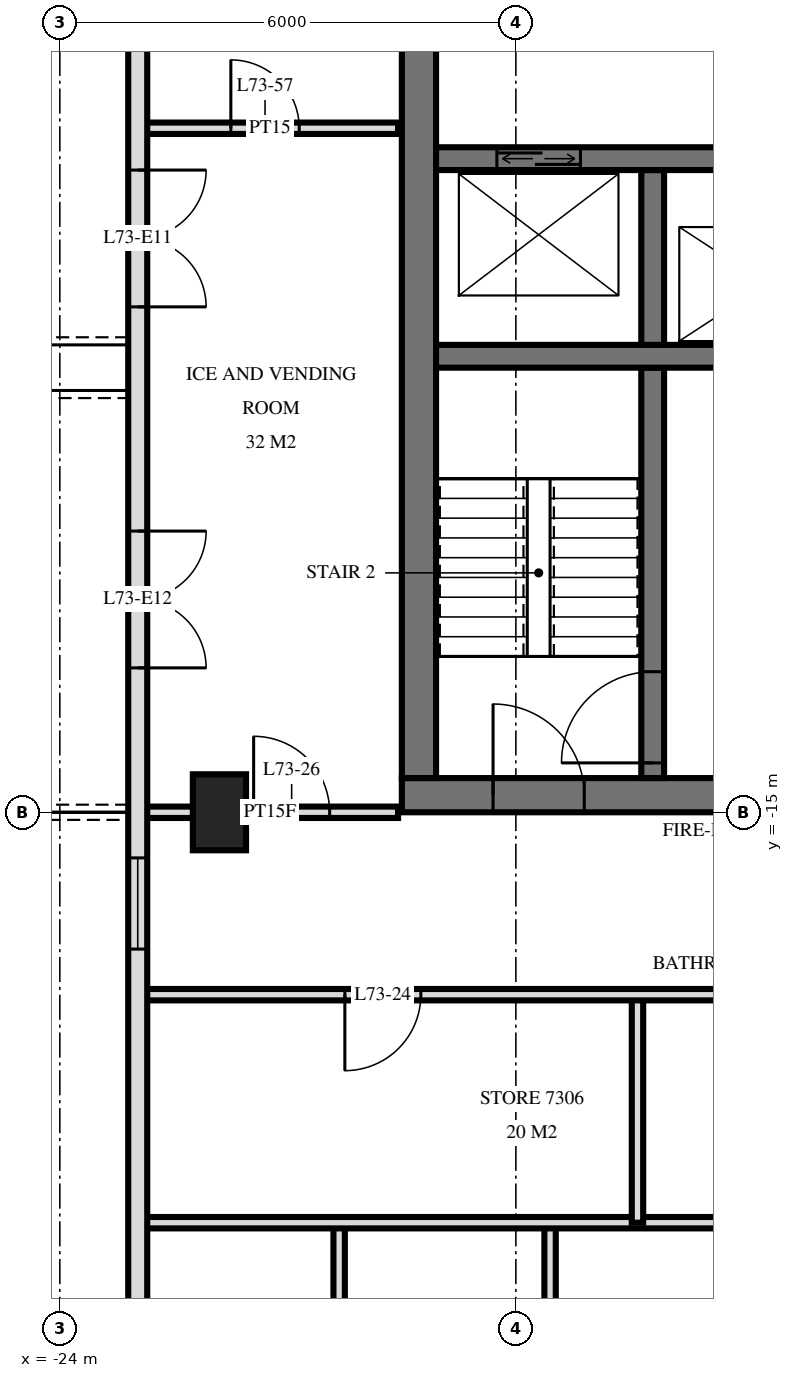
"""IFC4 building model, lengths in metres.
Left out: names, types, materials, properties, quantities, classifications, styles, units other than length and angle.
Written with IfcOpenShell. Run it as: python <this file> out.ifc"""

import sys

from ifc_helpers import new_model, si_unit, direction, frame, frame_2d, origin, origin_2d, place, context, subcontext, project, spatial, rectangle, extrude, element, fill, save


model = new_model("IFC4")
c1 = context("Model", 3, precision=1e-05, world=origin(), true_north=direction((0.0, 1.0)))
c2 = subcontext(c1, "Body", "Model", "MODEL_VIEW")
j1 = project(units=[si_unit("LENGTHUNIT", "METRE"), si_unit("PLANEANGLEUNIT", "RADIAN")], contexts=[c1])
p1 = place(None, origin())
s1 = spatial("IfcSite", under=j1, at=p1, CompositionType="ELEMENT")
p2 = place(p1, origin())
s2 = spatial("IfcBuilding", under=s1, at=p2, CompositionType="ELEMENT")
p3 = place(p2, frame((0.0, 0.0, 277.1)))
s3 = spatial("IfcBuildingStorey", under=s2, at=p3, CompositionType="ELEMENT", Elevation=277.1)
p4 = place(p3, frame((-21.9, -15.0, 0.0), z_axis=(0.0, 0.0, 1.0), x_axis=(0.0, 1.0, 0.0)))
e1 = element("IfcColumn", 1, at=p4, inside=s3, PredefinedType="COLUMN", context=c2, shape_type="SweptSolid", body=[
    extrude(rectangle(XDim=1.0, YDim=0.7, at=origin_2d()), origin(), (0.0, 0.0, 1.0), 3.5),
])
p5 = place(p3, frame((-19.5, -14.775, 0.0), z_axis=(0.0, 0.0, 1.0), x_axis=(1.0, 0.0, 0.0)))
e2 = element("IfcWall", 2, at=p5, inside=s3, PredefinedType="SHEAR", context=c2, shape_type="SweptSolid", body=[
    extrude(rectangle(XDim=9.5, YDim=0.45, at=frame_2d((4.75, 0.0))), origin(), (0.0, 0.0, 1.0), 3.5),
])
p6 = place(p5, frame((1.2, 0.0, 0.0)))
e3 = element("IfcOpeningElement", 3, at=p6, cuts=e2, PredefinedType="OPENING", context=c2, shape_type="SweptSolid", body=[
    extrude(rectangle(XDim=1.2, YDim=2.1, at=frame_2d((0.6, 1.05))), frame((0.0, 0.235, 0.0), z_axis=(0.0, -1.0, 0.0), x_axis=(1.0, 0.0, 0.0)), (0.0, 0.0, 1.0), 0.47),
])
p7 = place(p5, frame((4.25, 0.0, 0.0)))
e4 = element("IfcOpeningElement", 4, at=p7, cuts=e2, PredefinedType="OPENING", context=c2, shape_type="SweptSolid", body=[
    extrude(rectangle(XDim=1.1, YDim=2.1, at=frame_2d((0.55, 1.05))), frame((0.0, 0.235, 0.0), z_axis=(0.0, -1.0, 0.0), x_axis=(1.0, 0.0, 0.0)), (0.0, 0.0, 1.0), 0.47),
])
p8 = place(p3, frame((-19.275, -14.55, 0.0), z_axis=(0.0, 0.0, 1.0), x_axis=(0.0, 1.0, 0.0)))
e5 = element("IfcWall", 5, at=p8, inside=s3, PredefinedType="SHEAR", context=c2, shape_type="SweptSolid", body=[
    extrude(rectangle(XDim=14.1, YDim=0.45, at=frame_2d((7.05, 0.0))), origin(), (0.0, 0.0, 1.0), 3.5),
])
p9 = place(p3, frame((-19.05, -6.4, 0.0), z_axis=(0.0, 0.0, 1.0), x_axis=(1.0, 0.0, 0.0)))
e6 = element("IfcWall", 6, at=p9, inside=s3, PredefinedType="SHEAR", context=c2, shape_type="SweptSolid", body=[
    extrude(rectangle(XDim=8.7, YDim=0.3, at=frame_2d((4.35, 0.0))), origin(), (0.0, 0.0, 1.0), 3.5),
])
p10 = place(p9, frame((0.8, 0.0, 0.0)))
e7 = element("IfcOpeningElement", 7, at=p10, cuts=e6, PredefinedType="OPENING", context=c2, shape_type="SweptSolid", body=[
    extrude(rectangle(XDim=1.1, YDim=2.1, at=frame_2d((0.55, 1.05))), frame((0.0, 0.16, 0.0), z_axis=(0.0, -1.0, 0.0), x_axis=(1.0, 0.0, 0.0)), (0.0, 0.0, 1.0), 0.32),
])
p11 = place(p3, frame((-19.05, -9.0, 0.0), z_axis=(0.0, 0.0, 1.0), x_axis=(1.0, 0.0, 0.0)))
e8 = element("IfcWall", 8, at=p11, inside=s3, PredefinedType="SHEAR", context=c2, shape_type="SweptSolid", body=[
    extrude(rectangle(XDim=8.7, YDim=0.3, at=frame_2d((4.35, 0.0))), origin(), (0.0, 0.0, 1.0), 3.5),
])
p12 = place(p11, frame((3.8, 0.0, 0.0)))
e9 = element("IfcOpeningElement", 9, at=p12, cuts=e8, PredefinedType="OPENING", context=c2, shape_type="SweptSolid", body=[
    extrude(rectangle(XDim=1.1, YDim=2.1, at=frame_2d((0.55, 1.05))), frame((0.0, 0.16, 0.0), z_axis=(0.0, -1.0, 0.0), x_axis=(1.0, 0.0, 0.0)), (0.0, 0.0, 1.0), 0.32),
])
p13 = place(p3, frame((-16.2, -8.85, 0.0), z_axis=(0.0, 0.0, 1.0), x_axis=(0.0, 1.0, 0.0)))
e10 = element("IfcWall", 10, at=p13, inside=s3, PredefinedType="SHEAR", context=c2, shape_type="SweptSolid", body=[
    extrude(rectangle(XDim=2.3, YDim=0.3, at=frame_2d((1.15, 0.0))), origin(), (0.0, 0.0, 1.0), 3.5),
])
p14 = place(p3, frame((-16.2, -14.55, 0.0), z_axis=(0.0, 0.0, 1.0), x_axis=(0.0, 1.0, 0.0)))
e11 = element("IfcWall", 11, at=p14, inside=s3, PredefinedType="SHEAR", context=c2, shape_type="SweptSolid", body=[
    extrude(rectangle(XDim=5.4, YDim=0.3, at=frame_2d((2.7, 0.0))), origin(), (0.0, 0.0, 1.0), 3.5),
])
p15 = place(p14, frame((0.2, 0.0, 0.0)))
e12 = element("IfcOpeningElement", 12, at=p15, cuts=e11, PredefinedType="OPENING", context=c2, shape_type="SweptSolid", body=[
    extrude(rectangle(XDim=1.2, YDim=2.1, at=frame_2d((0.6, 1.05))), frame((0.0, 0.16, 0.0), z_axis=(0.0, -1.0, 0.0), x_axis=(1.0, 0.0, 0.0)), (0.0, 0.0, 1.0), 0.32),
])
p16 = place(p3, frame((-22.975, -3.325, 0.0), z_axis=(0.0, 0.0, 1.0), x_axis=(0.0, -1.0, 0.0)))
e13 = element("IfcWall", 13, at=p16, inside=s3, PredefinedType="SOLIDWALL", context=c2, shape_type="SweptSolid", body=[
    extrude(rectangle(XDim=25.951, YDim=0.25, at=frame_2d((12.975, 0.0))), origin(), (0.0, 0.0, 1.0), 3.22),
])
p17 = place(p16, frame((3.225, 0.0, 0.0)))
e14 = element("IfcOpeningElement", 14, at=p17, cuts=e13, PredefinedType="OPENING", context=c2, shape_type="SweptSolid", body=[
    extrude(rectangle(XDim=1.8, YDim=2.4, at=frame_2d((0.9, 1.2))), frame((0.0, 0.135, 0.0), z_axis=(0.0, -1.0, 0.0), x_axis=(1.0, 0.0, 0.0)), (0.0, 0.0, 1.0), 0.27),
])
p18 = place(p16, frame((7.975, 0.0, 0.0)))
e15 = element("IfcOpeningElement", 15, at=p18, cuts=e13, PredefinedType="OPENING", context=c2, shape_type="SweptSolid", body=[
    extrude(rectangle(XDim=1.8, YDim=2.4, at=frame_2d((0.9, 1.2))), frame((0.0, 0.135, 0.0), z_axis=(0.0, -1.0, 0.0), x_axis=(1.0, 0.0, 0.0)), (0.0, 0.0, 1.0), 0.27),
])
p19 = place(p16, frame((12.275, 0.0, 0.9)))
e16 = element("IfcOpeningElement", 16, at=p19, cuts=e13, PredefinedType="OPENING", context=c2, shape_type="SweptSolid", body=[
    extrude(rectangle(XDim=1.2, YDim=1.5, at=frame_2d((0.6, 0.75))), frame((0.0, 0.135, 0.0), z_axis=(0.0, -1.0, 0.0), x_axis=(1.0, 0.0, 0.0)), (0.0, 0.0, 1.0), 0.27),
])
p20 = place(p16, frame((18.175, 0.0, 0.0)))
e17 = element("IfcOpeningElement", 17, at=p20, cuts=e13, PredefinedType="OPENING", context=c2, shape_type="SweptSolid", body=[
    extrude(rectangle(XDim=1.8, YDim=2.4, at=frame_2d((0.9, 1.2))), frame((0.0, 0.135, 0.0), z_axis=(0.0, -1.0, 0.0), x_axis=(1.0, 0.0, 0.0)), (0.0, 0.0, 1.0), 0.27),
])
p21 = place(p16, frame((21.075, 0.0, 0.0)))
e18 = element("IfcOpeningElement", 18, at=p21, cuts=e13, PredefinedType="OPENING", context=c2, shape_type="SweptSolid", body=[
    extrude(rectangle(XDim=1.8, YDim=2.4, at=frame_2d((0.9, 1.2))), frame((0.0, 0.135, 0.0), z_axis=(0.0, -1.0, 0.0), x_axis=(1.0, 0.0, 0.0)), (0.0, 0.0, 1.0), 0.27),
])
p22 = place(p16, frame((23.825, 0.0, 0.9)))
e19 = element("IfcOpeningElement", 19, at=p22, cuts=e13, PredefinedType="OPENING", context=c2, shape_type="SweptSolid", body=[
    extrude(rectangle(XDim=1.8, YDim=1.5, at=frame_2d((0.9, 0.75))), frame((0.0, 0.135, 0.0), z_axis=(0.0, -1.0, 0.0), x_axis=(1.0, 0.0, 0.0)), (0.0, 0.0, 1.0), 0.27),
])
p23 = place(p3, frame((-16.4, -20.4, 0.0), z_axis=(0.0, 0.0, 1.0), x_axis=(0.0, 1.0, 0.0)))
e20 = element("IfcWall", 20, at=p23, inside=s3, PredefinedType="PARTITIONING", context=c2, shape_type="SweptSolid", body=[
    extrude(rectangle(XDim=3.0, YDim=0.15, at=frame_2d((1.5, 0.0))), origin(), (0.0, 0.0, 1.0), 3.22),
])
p24 = place(p3, frame((-17.55, -33.62, 0.0), z_axis=(0.0, 0.0, 1.0), x_axis=(0.0, 1.0, 0.0)))
e21 = element("IfcWall", 21, at=p24, inside=s3, PredefinedType="PARTITIONING", context=c2, shape_type="SweptSolid", body=[
    extrude(rectangle(XDim=13.22, YDim=0.15, at=frame_2d((6.61, 0.0))), origin(), (0.0, 0.0, 1.0), 3.22),
])
p25 = place(p24, frame((6.09, 0.0, 0.0)))
e22 = element("IfcOpeningElement", 22, at=p25, cuts=e21, PredefinedType="OPENING", context=c2, shape_type="SweptSolid", body=[
    extrude(rectangle(XDim=0.9, YDim=2.1, at=frame_2d((0.45, 1.05))), frame((0.0, 0.085, 0.0), z_axis=(0.0, -1.0, 0.0), x_axis=(1.0, 0.0, 0.0)), (0.0, 0.0, 1.0), 0.17),
])
p26 = place(p3, frame((-20.325, -33.239, 0.0), z_axis=(0.0, 0.0, 1.0), x_axis=(0.0, 1.0, 0.0)))
e23 = element("IfcWall", 23, at=p26, inside=s3, PredefinedType="PARTITIONING", context=c2, shape_type="SweptSolid", body=[
    extrude(rectangle(XDim=12.839, YDim=0.15, at=frame_2d((6.419, 0.0))), origin(), (0.0, 0.0, 1.0), 3.22),
])
p27 = place(p26, frame((5.853, 0.0, 0.0)))
e24 = element("IfcOpeningElement", 24, at=p27, cuts=e23, PredefinedType="OPENING", context=c2, shape_type="SweptSolid", body=[
    extrude(rectangle(XDim=0.9, YDim=2.1, at=frame_2d((0.45, 1.05))), frame((0.0, 0.085, 0.0), z_axis=(0.0, -1.0, 0.0), x_axis=(1.0, 0.0, 0.0)), (0.0, 0.0, 1.0), 0.17),
])
p28 = place(p3, frame((-22.92, -20.4, 0.0), z_axis=(0.0, 0.0, 1.0), x_axis=(1.0, 0.0, 0.0)))
e25 = element("IfcWall", 25, at=p28, inside=s3, PredefinedType="PARTITIONING", context=c2, shape_type="SweptSolid", body=[
    extrude(rectangle(XDim=8.92, YDim=0.15, at=frame_2d((4.46, 0.0))), origin(), (0.0, 0.0, 1.0), 3.22),
])
p29 = place(p3, frame((-22.92, -17.4, 0.0), z_axis=(0.0, 0.0, 1.0), x_axis=(1.0, 0.0, 0.0)))
e26 = element("IfcWall", 26, at=p29, inside=s3, PredefinedType="PARTITIONING", context=c2, shape_type="SweptSolid", body=[
    extrude(rectangle(XDim=45.84, YDim=0.15, at=frame_2d((22.92, 0.0))), origin(), (0.0, 0.0, 1.0), 3.22),
])
p30 = place(p29, frame((21.67, 0.0, 0.0)))
e27 = element("IfcOpeningElement", 27, at=p30, cuts=e26, PredefinedType="OPENING", context=c2, shape_type="SweptSolid", body=[
    extrude(rectangle(XDim=1.0, YDim=2.1, at=frame_2d((0.5, 1.05))), frame((0.0, 0.085, 0.0), z_axis=(0.0, -1.0, 0.0), x_axis=(1.0, 0.0, 0.0)), (0.0, 0.0, 1.0), 0.17),
])
p31 = place(p29, frame((24.77, 0.0, 0.0)))
e28 = element("IfcOpeningElement", 28, at=p31, cuts=e26, PredefinedType="OPENING", context=c2, shape_type="SweptSolid", body=[
    extrude(rectangle(XDim=1.0, YDim=2.1, at=frame_2d((0.5, 1.05))), frame((0.0, 0.085, 0.0), z_axis=(0.0, -1.0, 0.0), x_axis=(1.0, 0.0, 0.0)), (0.0, 0.0, 1.0), 0.17),
])
p32 = place(p29, frame((26.07, 0.0, 0.0)))
e29 = element("IfcOpeningElement", 29, at=p32, cuts=e26, PredefinedType="OPENING", context=c2, shape_type="SweptSolid", body=[
    extrude(rectangle(XDim=1.0, YDim=2.1, at=frame_2d((0.5, 1.05))), frame((0.0, 0.085, 0.0), z_axis=(0.0, -1.0, 0.0), x_axis=(1.0, 0.0, 0.0)), (0.0, 0.0, 1.0), 0.17),
])
p33 = place(p29, frame((30.77, 0.0, 0.0)))
e30 = element("IfcOpeningElement", 30, at=p33, cuts=e26, PredefinedType="OPENING", context=c2, shape_type="SweptSolid", body=[
    extrude(rectangle(XDim=1.0, YDim=2.1, at=frame_2d((0.5, 1.05))), frame((0.0, 0.085, 0.0), z_axis=(0.0, -1.0, 0.0), x_axis=(1.0, 0.0, 0.0)), (0.0, 0.0, 1.0), 0.17),
])
p34 = place(p29, frame((32.07, 0.0, 0.0)))
e31 = element("IfcOpeningElement", 31, at=p34, cuts=e26, PredefinedType="OPENING", context=c2, shape_type="SweptSolid", body=[
    extrude(rectangle(XDim=1.0, YDim=2.1, at=frame_2d((0.5, 1.05))), frame((0.0, 0.085, 0.0), z_axis=(0.0, -1.0, 0.0), x_axis=(1.0, 0.0, 0.0)), (0.0, 0.0, 1.0), 0.17),
])
p35 = place(p29, frame((9.42, 0.0, 0.0)))
e32 = element("IfcOpeningElement", 32, at=p35, cuts=e26, PredefinedType="OPENING", context=c2, shape_type="SweptSolid", body=[
    extrude(rectangle(XDim=1.0, YDim=2.1, at=frame_2d((0.5, 1.05))), frame((0.0, 0.085, 0.0), z_axis=(0.0, -1.0, 0.0), x_axis=(1.0, 0.0, 0.0)), (0.0, 0.0, 1.0), 0.17),
])
p36 = place(p29, frame((2.67, 0.0, 0.0)))
e33 = element("IfcOpeningElement", 33, at=p36, cuts=e26, PredefinedType="OPENING", context=c2, shape_type="SweptSolid", body=[
    extrude(rectangle(XDim=1.0, YDim=2.1, at=frame_2d((0.5, 1.05))), frame((0.0, 0.085, 0.0), z_axis=(0.0, -1.0, 0.0), x_axis=(1.0, 0.0, 0.0)), (0.0, 0.0, 1.0), 0.17),
])
p37 = place(p29, frame((37.82, 0.0, 0.0)))
e34 = element("IfcOpeningElement", 34, at=p37, cuts=e26, PredefinedType="OPENING", context=c2, shape_type="SweptSolid", body=[
    extrude(rectangle(XDim=1.0, YDim=2.1, at=frame_2d((0.5, 1.05))), frame((0.0, 0.085, 0.0), z_axis=(0.0, -1.0, 0.0), x_axis=(1.0, 0.0, 0.0)), (0.0, 0.0, 1.0), 0.17),
])
p38 = place(p3, frame((-22.92, -15.0, 0.0), z_axis=(0.0, 0.0, 1.0), x_axis=(1.0, 0.0, 0.0)))
e35 = element("IfcWall", 35, at=p38, inside=s3, PredefinedType="PARTITIONING", context=c2, shape_type="SweptSolid", body=[
    extrude(rectangle(XDim=3.37, YDim=0.15, at=frame_2d((1.685, 0.0))), origin(), (0.0, 0.0, 1.0), 3.22),
])
p39 = place(p38, frame((1.47, 0.0, 0.0)))
e36 = element("IfcOpeningElement", 36, at=p39, cuts=e35, PredefinedType="OPENING", context=c2, shape_type="SweptSolid", body=[
    extrude(rectangle(XDim=1.0, YDim=2.1, at=frame_2d((0.5, 1.05))), frame((0.0, 0.085, 0.0), z_axis=(0.0, -1.0, 0.0), x_axis=(1.0, 0.0, 0.0)), (0.0, 0.0, 1.0), 0.17),
])
p40 = place(p3, frame((-22.92, -6.0, 0.0), z_axis=(0.0, 0.0, 1.0), x_axis=(1.0, 0.0, 0.0)))
e37 = element("IfcWall", 37, at=p40, inside=s3, PredefinedType="PARTITIONING", context=c2, shape_type="SweptSolid", body=[
    extrude(rectangle(XDim=3.37, YDim=0.15, at=frame_2d((1.685, 0.0))), origin(), (0.0, 0.0, 1.0), 3.22),
])
p41 = place(p40, frame((1.17, 0.0, 0.0)))
e38 = element("IfcOpeningElement", 38, at=p41, cuts=e37, PredefinedType="OPENING", context=c2, shape_type="SweptSolid", body=[
    extrude(rectangle(XDim=0.9, YDim=2.1, at=frame_2d((0.45, 1.05))), frame((0.0, 0.085, 0.0), z_axis=(0.0, -1.0, 0.0), x_axis=(1.0, 0.0, 0.0)), (0.0, 0.0, 1.0), 0.17),
])
p42 = place(p17, origin())
e39 = element("IfcDoor", 39, at=p42, inside=s3, OperationType="DOUBLE_DOOR_SINGLE_SWING", PredefinedType="DOOR", context=c2, shape_type="SweptSolid", body=[
    extrude(rectangle(XDim=1.8, YDim=2.4, at=frame_2d((0.9, 1.2))), frame((0.0, 0.025, 0.0), z_axis=(0.0, -1.0, 0.0), x_axis=(1.0, 0.0, 0.0)), (0.0, 0.0, 1.0), 0.05),
])
fill(e14, e39)
p43 = place(p18, origin())
e40 = element("IfcDoor", 40, at=p43, inside=s3, OperationType="DOUBLE_DOOR_SINGLE_SWING", PredefinedType="DOOR", context=c2, shape_type="SweptSolid", body=[
    extrude(rectangle(XDim=1.8, YDim=2.4, at=frame_2d((0.9, 1.2))), frame((0.0, 0.025, 0.0), z_axis=(0.0, -1.0, 0.0), x_axis=(1.0, 0.0, 0.0)), (0.0, 0.0, 1.0), 0.05),
])
fill(e15, e40)
p44 = place(p19, origin())
e41 = element("IfcWindow", 41, at=p44, inside=s3, PartitioningType="SINGLE_PANEL", PredefinedType="WINDOW", context=c2, shape_type="SweptSolid", body=[
    extrude(rectangle(XDim=1.2, YDim=1.5, at=frame_2d((0.6, 0.75))), frame((0.0, 0.03, 0.0), z_axis=(0.0, -1.0, 0.0), x_axis=(1.0, 0.0, 0.0)), (0.0, 0.0, 1.0), 0.06),
])
fill(e16, e41)
p45 = place(p10, origin())
e42 = element("IfcDoor", 42, at=p45, inside=s3, OperationType="DOUBLE_DOOR_SLIDING", PredefinedType="USERDEFINED", context=c2, shape_type="SweptSolid", body=[
    extrude(rectangle(XDim=1.1, YDim=2.1, at=frame_2d((0.55, 1.05))), frame((0.0, 0.025, 0.0), z_axis=(0.0, -1.0, 0.0), x_axis=(1.0, 0.0, 0.0)), (0.0, 0.0, 1.0), 0.05),
])
fill(e7, e42)
p46 = place(p6, origin())
e43 = element("IfcDoor", 43, at=p46, inside=s3, OperationType="SINGLE_SWING_RIGHT", PredefinedType="DOOR", context=c2, shape_type="SweptSolid", body=[
    extrude(rectangle(XDim=1.2, YDim=2.1, at=frame_2d((0.6, 1.05))), frame((0.0, 0.025, 0.0), z_axis=(0.0, -1.0, 0.0), x_axis=(1.0, 0.0, 0.0)), (0.0, 0.0, 1.0), 0.05),
])
fill(e3, e43)
p47 = place(p15, origin())
e44 = element("IfcDoor", 44, at=p47, inside=s3, OperationType="SINGLE_SWING_RIGHT", PredefinedType="DOOR", context=c2, shape_type="SweptSolid", body=[
    extrude(rectangle(XDim=1.2, YDim=2.1, at=frame_2d((0.6, 1.05))), frame((0.0, 0.025, 0.0), z_axis=(0.0, -1.0, 0.0), x_axis=(1.0, 0.0, 0.0)), (0.0, 0.0, 1.0), 0.05),
])
fill(e12, e44)
p48 = place(p36, frame((0.5, 0.0, 0.0), z_axis=(0.0, 0.0, 1.0), x_axis=(-1.0, 0.0, 0.0)))
e45 = element("IfcDoor", 45, at=p48, inside=s3, OperationType="SINGLE_SWING_LEFT", PredefinedType="DOOR", context=c2, shape_type="SweptSolid", body=[
    extrude(rectangle(XDim=1.0, YDim=2.1, at=frame_2d((0.0, 1.05))), frame((0.0, -0.025, 0.0), z_axis=(0.0, 1.0, 0.0), x_axis=(-1.0, 0.0, 0.0)), (0.0, 0.0, 1.0), 0.05),
])
fill(e33, e45)
p49 = place(p39, origin())
e46 = element("IfcDoor", 46, at=p49, inside=s3, OperationType="SINGLE_SWING_RIGHT", PredefinedType="DOOR", context=c2, shape_type="SweptSolid", body=[
    extrude(rectangle(XDim=1.0, YDim=2.1, at=frame_2d((0.5, 1.05))), frame((0.0, 0.025, 0.0), z_axis=(0.0, -1.0, 0.0), x_axis=(1.0, 0.0, 0.0)), (0.0, 0.0, 1.0), 0.05),
])
fill(e36, e46)
p50 = place(p41, origin())
e47 = element("IfcDoor", 47, at=p50, inside=s3, OperationType="SINGLE_SWING_RIGHT", PredefinedType="DOOR", context=c2, shape_type="SweptSolid", body=[
    extrude(rectangle(XDim=0.9, YDim=2.1, at=frame_2d((0.45, 1.05))), frame((0.0, 0.025, 0.0), z_axis=(0.0, -1.0, 0.0), x_axis=(1.0, 0.0, 0.0)), (0.0, 0.0, 1.0), 0.05),
])
fill(e38, e47)
save(model, sys.argv[1])
